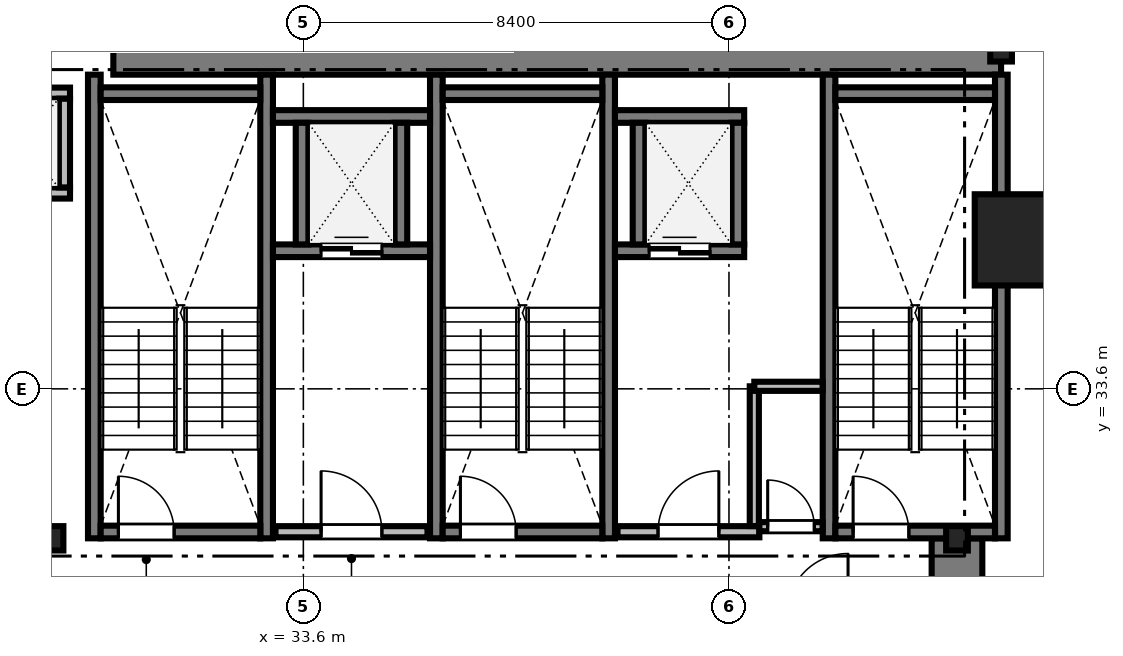
"""IFC4 building model, lengths in metres.
Left out: names, types, materials, properties, quantities, classifications, styles, units other than length and angle.
Written with IfcOpenShell. Run it as: python <this file> out.ifc"""

import sys

from ifc_helpers import new_model, si_unit, direction, frame, frame_2d, origin, origin_2d, place, context, subcontext, project, spatial, rectangle, i_section, extrude, source, transform, mapped, element, fill, save


model = new_model("IFC4")
c1 = context("Model", 3, precision=1e-05, world=origin(), true_north=direction((0.0, 1.0)))
c2 = subcontext(c1, "Body", "Model", "MODEL_VIEW")
j1 = project(units=[si_unit("LENGTHUNIT", "METRE"), si_unit("PLANEANGLEUNIT", "RADIAN")], contexts=[c1])
p1 = place(None, origin())
s1 = spatial("IfcSite", under=j1, at=p1, CompositionType="ELEMENT")
p2 = place(p1, origin())
s2 = spatial("IfcBuilding", under=s1, at=p2, CompositionType="ELEMENT")
p3 = place(p2, frame((0.0, 0.0, 27.6)))
s3 = spatial("IfcBuildingStorey", under=s2, at=p3, CompositionType="ELEMENT", Elevation=27.6)
m1 = source(origin(), c2, "Body", "SweptSolid", [
    extrude(rectangle(XDim=17.52, YDim=1.0, at=frame_2d((8.76, 0.0))), origin(), (0.0, 0.0, 1.0), 3.41),
])
p4 = place(p3, frame((29.85, 40.3, 0.0), z_axis=(0.0, 0.0, 1.0), x_axis=(1.0, 0.0, 0.0)))
e1 = element("IfcWall", 1, at=p4, inside=s3, PredefinedType="SHEAR", context=c2, shape_type="MappedRepresentation", body=[
    mapped(m1, transform((0.0, 0.0, 0.0), scale=1.0)),
])
m2 = source(origin(), c2, "Body", "SweptSolid", [
    extrude(rectangle(XDim=13.15, YDim=1.0, at=frame_2d((6.575, 0.0))), origin(), (0.0, 0.0, 1.0), 3.41),
])
p5 = place(p3, frame((46.5, 17.5, 0.0), z_axis=(0.0, 0.0, 1.0), x_axis=(0.0, 1.0, 0.0)))
e2 = element("IfcWall", 2, at=p5, inside=s3, PredefinedType="SHEAR", context=c2, shape_type="MappedRepresentation", body=[
    mapped(m2, transform((0.0, 0.0, 0.0), scale=1.0)),
])
m3 = source(origin(), c2, "Body", "SweptSolid", [
    extrude(i_section(OverallWidth=0.428, OverallDepth=0.481, WebThickness=0.04, FlangeThickness=0.063, FilletRadius=0.015, at=origin_2d()), origin(), (0.0, 0.0, 1.0), 3.41),
])
for number, where, z_axis, x_axis in (
    (3, (28.65, 30.65, 0.0), (0.0, 0.0, 1.0), (1.0, 0.0, 0.0)),
    (4, (46.5, 30.65, 0.0), (0.0, 0.0, 1.0), (1.0, 0.0, 0.0)),
    (5, (47.37, 40.3, 0.0), (0.0, 0.0, 1.0), (1.0, 0.0, 0.0)),
):
    element("IfcColumn", number, at=place(p3, frame(where, z_axis=z_axis, x_axis=x_axis)), inside=s3, PredefinedType="COLUMN", context=c2, shape_type="MappedRepresentation", body=[
        mapped(m3, transform((0.0, 0.0, 0.0), scale=1.0)),
    ])
m4 = source(origin(), c2, "Body", "SweptSolid", [
    extrude(rectangle(XDim=1.8, YDim=1.8, at=origin_2d()), origin(), (0.0, 0.0, 1.0), 3.41),
])
p6 = place(p3, frame((47.75, 36.54, 0.0), z_axis=(0.0, 0.0, 1.0), x_axis=(1.0, 0.0, 0.0)))
e6 = element("IfcColumn", 6, at=p6, inside=s3, PredefinedType="COLUMN", context=c2, shape_type="MappedRepresentation", body=[
    mapped(m4, transform((0.0, 0.0, 0.0), scale=1.0)),
])
m5 = source(origin(), c2, "Body", "SweptSolid", [
    extrude(rectangle(XDim=9.15, YDim=0.25, at=frame_2d((4.575, 0.0))), origin(), (0.0, 0.0, 1.0), 3.45),
])
for number, where, z_axis, x_axis in (
    (7, (29.475, 30.65, 0.0), (0.0, 0.0, 1.0), (0.0, 1.0, 0.0)),
    (8, (32.875, 30.65, 0.0), (0.0, 0.0, 1.0), (0.0, 1.0, 0.0)),
):
    element("IfcWall", number, at=place(p3, frame(where, z_axis=z_axis, x_axis=x_axis)), inside=s3, PredefinedType="SOLIDWALL", context=c2, shape_type="MappedRepresentation", body=[
        mapped(m5, transform((0.0, 0.0, 0.0), scale=1.0)),
    ])
m6 = source(origin(), c2, "Body", "SweptSolid", [
    extrude(rectangle(XDim=3.15, YDim=0.25, at=frame_2d((1.575, 0.0))), origin(), (0.0, 0.0, 1.0), 3.45),
])
p7 = place(p3, frame((29.6, 39.425, 0.0), z_axis=(0.0, 0.0, 1.0), x_axis=(1.0, 0.0, 0.0)))
e9 = element("IfcWall", 9, at=p7, inside=s3, PredefinedType="SOLIDWALL", context=c2, shape_type="MappedRepresentation", body=[
    mapped(m6, transform((0.0, 0.0, 0.0), scale=1.0)),
])
p8 = place(p3, frame((29.6, 30.775, 0.0), z_axis=(0.0, 0.0, 1.0), x_axis=(1.0, 0.0, 0.0)))
e10 = element("IfcWall", 10, at=p8, inside=s3, PredefinedType="SOLIDWALL", context=c2, shape_type="MappedRepresentation", body=[
    mapped(m6, transform((0.0, 0.0, 0.0), scale=1.0)),
])
m7 = source(origin(), c2, "Body", "SweptSolid", [
    extrude(rectangle(XDim=1.1, YDim=2.2, at=frame_2d((0.55, 1.1))), frame((0.0, 0.135, 0.0), z_axis=(0.0, -1.0, 0.0), x_axis=(1.0, 0.0, 0.0)), (0.0, 0.0, 1.0), 0.27),
])
p9 = place(p8, frame((0.35, 0.0, 0.0)))
e11 = element("IfcOpeningElement", 11, at=p9, cuts=e10, PredefinedType="OPENING", context=c2, shape_type="MappedRepresentation", body=[
    mapped(m7, transform((0.0, 0.0, 0.0), scale=1.0)),
])
for number, where, z_axis, x_axis in (
    (12, (36.225, 30.65, 0.0), (0.0, 0.0, 1.0), (0.0, 1.0, 0.0)),
    (13, (39.625, 30.65, 0.0), (0.0, 0.0, 1.0), (0.0, 1.0, 0.0)),
):
    element("IfcWall", number, at=place(p3, frame(where, z_axis=z_axis, x_axis=x_axis)), inside=s3, PredefinedType="SOLIDWALL", context=c2, shape_type="MappedRepresentation", body=[
        mapped(m5, transform((0.0, 0.0, 0.0), scale=1.0)),
    ])
p10 = place(p3, frame((36.35, 39.425, 0.0), z_axis=(0.0, 0.0, 1.0), x_axis=(1.0, 0.0, 0.0)))
e14 = element("IfcWall", 14, at=p10, inside=s3, PredefinedType="SOLIDWALL", context=c2, shape_type="MappedRepresentation", body=[
    mapped(m6, transform((0.0, 0.0, 0.0), scale=1.0)),
])
p11 = place(p3, frame((36.35, 30.775, 0.0), z_axis=(0.0, 0.0, 1.0), x_axis=(1.0, 0.0, 0.0)))
e15 = element("IfcWall", 15, at=p11, inside=s3, PredefinedType="SOLIDWALL", context=c2, shape_type="MappedRepresentation", body=[
    mapped(m6, transform((0.0, 0.0, 0.0), scale=1.0)),
])
p12 = place(p11, frame((0.35, 0.0, 0.0)))
e16 = element("IfcOpeningElement", 16, at=p12, cuts=e15, PredefinedType="OPENING", context=c2, shape_type="MappedRepresentation", body=[
    mapped(m7, transform((0.0, 0.0, 0.0), scale=1.0)),
])
for number, where, z_axis, x_axis in (
    (17, (43.975, 30.65, 0.0), (0.0, 0.0, 1.0), (0.0, 1.0, 0.0)),
    (18, (47.375, 30.65, 0.0), (0.0, 0.0, 1.0), (0.0, 1.0, 0.0)),
):
    element("IfcWall", number, at=place(p3, frame(where, z_axis=z_axis, x_axis=x_axis)), inside=s3, PredefinedType="SOLIDWALL", context=c2, shape_type="MappedRepresentation", body=[
        mapped(m5, transform((0.0, 0.0, 0.0), scale=1.0)),
    ])
p13 = place(p3, frame((44.1, 39.425, 0.0), z_axis=(0.0, 0.0, 1.0), x_axis=(1.0, 0.0, 0.0)))
e19 = element("IfcWall", 19, at=p13, inside=s3, PredefinedType="SOLIDWALL", context=c2, shape_type="MappedRepresentation", body=[
    mapped(m6, transform((0.0, 0.0, 0.0), scale=1.0)),
])
p14 = place(p3, frame((44.1, 30.775, 0.0), z_axis=(0.0, 0.0, 1.0), x_axis=(1.0, 0.0, 0.0)))
e20 = element("IfcWall", 20, at=p14, inside=s3, PredefinedType="SOLIDWALL", context=c2, shape_type="MappedRepresentation", body=[
    mapped(m6, transform((0.0, 0.0, 0.0), scale=1.0)),
])
p15 = place(p14, frame((0.35, 0.0, 0.0)))
e21 = element("IfcOpeningElement", 21, at=p15, cuts=e20, PredefinedType="OPENING", context=c2, shape_type="MappedRepresentation", body=[
    mapped(m7, transform((0.0, 0.0, 0.0), scale=1.0)),
])
m8 = source(origin(), c2, "Body", "SweptSolid", [
    extrude(rectangle(XDim=3.0, YDim=0.22, at=frame_2d((1.5, 0.0))), origin(), (0.0, 0.0, 1.0), 3.41),
])
p16 = place(p3, frame((33.05, 30.78, 0.0), z_axis=(0.0, 0.0, 1.0), x_axis=(1.0, 0.0, 0.0)))
e22 = element("IfcWall", 22, at=p16, inside=s3, PredefinedType="SOLIDWALL", context=c2, shape_type="MappedRepresentation", body=[
    mapped(m8, transform((0.0, 0.0, 0.0), scale=1.0)),
])
m9 = source(origin(), c2, "Body", "SweptSolid", [
    extrude(rectangle(XDim=1.2, YDim=2.2, at=frame_2d((0.6, 1.1))), frame((0.0, 0.12, 0.0), z_axis=(0.0, -1.0, 0.0), x_axis=(1.0, 0.0, 0.0)), (0.0, 0.0, 1.0), 0.24),
])
p17 = place(p16, frame((0.9, 0.0, 0.0)))
e23 = element("IfcOpeningElement", 23, at=p17, cuts=e22, PredefinedType="OPENING", context=c2, shape_type="MappedRepresentation", body=[
    mapped(m9, transform((0.0, 0.0, 0.0), scale=1.0)),
])
m10 = source(origin(), c2, "Body", "SweptSolid", [
    extrude(rectangle(XDim=2.8, YDim=0.22, at=frame_2d((1.4, 0.0))), origin(), (0.0, 0.0, 1.0), 3.41),
])
p18 = place(p3, frame((39.8, 30.78, 0.0), z_axis=(0.0, 0.0, 1.0), x_axis=(1.0, 0.0, 0.0)))
e24 = element("IfcWall", 24, at=p18, inside=s3, PredefinedType="SOLIDWALL", context=c2, shape_type="MappedRepresentation", body=[
    mapped(m10, transform((0.0, 0.0, 0.0), scale=1.0)),
])
p19 = place(p18, frame((0.8, 0.0, 0.0)))
e25 = element("IfcOpeningElement", 25, at=p19, cuts=e24, PredefinedType="OPENING", context=c2, shape_type="MappedRepresentation", body=[
    mapped(m9, transform((0.0, 0.0, 0.0), scale=1.0)),
])
m11 = source(origin(), c2, "Body", "SweptSolid", [
    extrude(rectangle(XDim=1.99, YDim=0.22, at=frame_2d((0.995, 0.0))), origin(), (0.0, 0.0, 1.0), 3.41),
])
p20 = place(p3, frame((27.005, 37.465, 0.0), z_axis=(0.0, 0.0, 1.0), x_axis=(1.0, 0.0, 0.0)))
e26 = element("IfcWall", 26, at=p20, inside=s3, PredefinedType="SOLIDWALL", context=c2, shape_type="MappedRepresentation", body=[
    mapped(m11, transform((0.0, 0.0, 0.0), scale=1.0)),
])
m12 = source(origin(), c2, "Body", "SweptSolid", [
    extrude(rectangle(XDim=1.1, YDim=2.2, at=frame_2d((0.55, 1.1))), frame((0.0, 0.12, 0.0), z_axis=(0.0, -1.0, 0.0), x_axis=(1.0, 0.0, 0.0)), (0.0, 0.0, 1.0), 0.24),
])
p21 = place(p20, frame((0.445, 0.0, 0.0)))
e27 = element("IfcOpeningElement", 27, at=p21, cuts=e26, PredefinedType="OPENING", context=c2, shape_type="MappedRepresentation", body=[
    mapped(m12, transform((0.0, 0.0, 0.0), scale=1.0)),
])
p22 = place(p3, frame((27.005, 39.435, 0.0), z_axis=(0.0, 0.0, 1.0), x_axis=(1.0, 0.0, 0.0)))
e28 = element("IfcWall", 28, at=p22, inside=s3, PredefinedType="SOLIDWALL", context=c2, shape_type="MappedRepresentation", body=[
    mapped(m11, transform((0.0, 0.0, 0.0), scale=1.0)),
])
m13 = source(origin(), c2, "Body", "SweptSolid", [
    extrude(rectangle(XDim=1.75, YDim=0.22, at=frame_2d((0.875, 0.0))), origin(), (0.0, 0.0, 1.0), 3.41),
])
p23 = place(p3, frame((28.885, 37.575, 0.0), z_axis=(0.0, 0.0, 1.0), x_axis=(0.0, 1.0, 0.0)))
e29 = element("IfcWall", 29, at=p23, inside=s3, PredefinedType="SOLIDWALL", context=c2, shape_type="MappedRepresentation", body=[
    mapped(m13, transform((0.0, 0.0, 0.0), scale=1.0)),
])
m14 = source(origin(), c2, "Body", "SweptSolid", [
    extrude(rectangle(XDim=3.1, YDim=0.25, at=frame_2d((1.55, 0.0))), origin(), (0.0, 0.0, 1.0), 3.41),
])
p24 = place(p3, frame((33.0, 36.325, 0.0), z_axis=(0.0, 0.0, 1.0), x_axis=(1.0, 0.0, 0.0)))
e30 = element("IfcWall", 30, at=p24, inside=s3, PredefinedType="SOLIDWALL", context=c2, shape_type="MappedRepresentation", body=[
    mapped(m14, transform((0.0, 0.0, 0.0), scale=1.0)),
])
m15 = source(origin(), c2, "Body", "SweptSolid", [
    extrude(rectangle(XDim=1.2, YDim=2.25, at=frame_2d((0.6, 1.125))), frame((0.0, 0.135, 0.0), z_axis=(0.0, -1.0, 0.0), x_axis=(1.0, 0.0, 0.0)), (0.0, 0.0, 1.0), 0.27),
])
p25 = place(p24, frame((0.95, 0.0, 0.0)))
e31 = element("IfcOpeningElement", 31, at=p25, cuts=e30, PredefinedType="OPENING", context=c2, shape_type="MappedRepresentation", body=[
    mapped(m15, transform((0.0, 0.0, 0.0), scale=1.0)),
])
p26 = place(p3, frame((33.0, 38.975, 0.0), z_axis=(0.0, 0.0, 1.0), x_axis=(1.0, 0.0, 0.0)))
e32 = element("IfcWall", 32, at=p26, inside=s3, PredefinedType="SOLIDWALL", context=c2, shape_type="MappedRepresentation", body=[
    mapped(m14, transform((0.0, 0.0, 0.0), scale=1.0)),
])
m16 = source(origin(), c2, "Body", "SweptSolid", [
    extrude(rectangle(XDim=2.4, YDim=0.25, at=frame_2d((1.2, 0.0))), origin(), (0.0, 0.0, 1.0), 3.41),
])
for number, where, z_axis, x_axis in (
    (33, (33.575, 36.45, 0.0), (0.0, 0.0, 1.0), (0.0, 1.0, 0.0)),
    (34, (35.525, 36.45, 0.0), (0.0, 0.0, 1.0), (0.0, 1.0, 0.0)),
):
    element("IfcWall", number, at=place(p3, frame(where, z_axis=z_axis, x_axis=x_axis)), inside=s3, PredefinedType="SOLIDWALL", context=c2, shape_type="MappedRepresentation", body=[
        mapped(m16, transform((0.0, 0.0, 0.0), scale=1.0)),
    ])
m17 = source(origin(), c2, "Body", "SweptSolid", [
    extrude(rectangle(XDim=2.55, YDim=0.25, at=frame_2d((1.275, 0.0))), origin(), (0.0, 0.0, 1.0), 3.41),
])
p27 = place(p3, frame((39.75, 36.325, 0.0), z_axis=(0.0, 0.0, 1.0), x_axis=(1.0, 0.0, 0.0)))
e35 = element("IfcWall", 35, at=p27, inside=s3, PredefinedType="SOLIDWALL", context=c2, shape_type="MappedRepresentation", body=[
    mapped(m17, transform((0.0, 0.0, 0.0), scale=1.0)),
])
p28 = place(p27, frame((0.675, 0.0, 0.0)))
e36 = element("IfcOpeningElement", 36, at=p28, cuts=e35, PredefinedType="OPENING", context=c2, shape_type="MappedRepresentation", body=[
    mapped(m15, transform((0.0, 0.0, 0.0), scale=1.0)),
])
p29 = place(p3, frame((39.75, 38.975, 0.0), z_axis=(0.0, 0.0, 1.0), x_axis=(1.0, 0.0, 0.0)))
e37 = element("IfcWall", 37, at=p29, inside=s3, PredefinedType="SOLIDWALL", context=c2, shape_type="MappedRepresentation", body=[
    mapped(m17, transform((0.0, 0.0, 0.0), scale=1.0)),
])
for number, where, z_axis, x_axis in (
    (38, (40.225, 36.45, 0.0), (0.0, 0.0, 1.0), (0.0, 1.0, 0.0)),
    (39, (42.175, 36.45, 0.0), (0.0, 0.0, 1.0), (0.0, 1.0, 0.0)),
):
    element("IfcWall", number, at=place(p3, frame(where, z_axis=z_axis, x_axis=x_axis)), inside=s3, PredefinedType="SOLIDWALL", context=c2, shape_type="MappedRepresentation", body=[
        mapped(m16, transform((0.0, 0.0, 0.0), scale=1.0)),
    ])
m18 = source(origin(), c2, "Body", "SweptSolid", [
    extrude(rectangle(XDim=1.248, YDim=0.18, at=frame_2d((0.624, 0.0))), origin(), (0.0, 0.0, 1.0), 3.41),
])
p30 = place(p3, frame((42.6, 30.88, 0.0), z_axis=(0.0, 0.0, 1.0), x_axis=(1.0, 0.0, 0.0)))
e40 = element("IfcWall", 40, at=p30, inside=s3, PredefinedType="PARTITIONING", context=c2, shape_type="MappedRepresentation", body=[
    mapped(m18, transform((0.0, 0.0, 0.0), scale=1.0)),
])
m19 = source(origin(), c2, "Body", "SweptSolid", [
    extrude(rectangle(XDim=0.92, YDim=2.1, at=frame_2d((0.46, 1.05))), frame((0.0, 0.1, 0.0), z_axis=(0.0, -1.0, 0.0), x_axis=(1.0, 0.0, 0.0)), (0.0, 0.0, 1.0), 0.2),
])
p31 = place(p30, frame((0.164, 0.0, 0.0)))
e41 = element("IfcOpeningElement", 41, at=p31, cuts=e40, PredefinedType="OPENING", context=c2, shape_type="MappedRepresentation", body=[
    mapped(m19, transform((0.0, 0.0, 0.0), scale=1.0)),
])
m20 = source(origin(), c2, "Body", "SweptSolid", [
    extrude(rectangle(XDim=2.758, YDim=0.18, at=frame_2d((1.379, 0.0))), origin(), (0.0, 0.0, 1.0), 3.41),
])
p32 = place(p3, frame((42.5, 30.892, 0.0), z_axis=(0.0, 0.0, 1.0), x_axis=(0.0, 1.0, 0.0)))
e42 = element("IfcWall", 42, at=p32, inside=s3, PredefinedType="PARTITIONING", context=c2, shape_type="MappedRepresentation", body=[
    mapped(m20, transform((0.0, 0.0, 0.0), scale=1.0)),
])
m21 = source(origin(), c2, "Body", "SweptSolid", [
    extrude(rectangle(XDim=1.348, YDim=0.18, at=frame_2d((0.674, 0.0))), origin(), (0.0, 0.0, 1.0), 3.41),
])
p33 = place(p3, frame((42.5, 33.65, 0.0), z_axis=(0.0, 0.0, 1.0), x_axis=(1.0, 0.0, 0.0)))
e43 = element("IfcWall", 43, at=p33, inside=s3, PredefinedType="PARTITIONING", context=c2, shape_type="MappedRepresentation", body=[
    mapped(m21, transform((0.0, 0.0, 0.0), scale=1.0)),
])
m22 = source(origin(), c2, "Body", "SweptSolid", [
    extrude(rectangle(XDim=1.1, YDim=2.2, at=frame_2d((0.55, 1.1))), frame((0.0, 0.025, 0.0), z_axis=(0.0, -1.0, 0.0), x_axis=(1.0, 0.0, 0.0)), (0.0, 0.0, 1.0), 0.05),
])
p34 = place(p9, origin())
e44 = element("IfcDoor", 44, at=p34, inside=s3, OperationType="SINGLE_SWING_LEFT", PredefinedType="DOOR", context=c2, shape_type="MappedRepresentation", body=[
    mapped(m22, transform((0.0, 0.0, 0.0), scale=1.0)),
])
fill(e11, e44)
p35 = place(p12, origin())
e45 = element("IfcDoor", 45, at=p35, inside=s3, OperationType="SINGLE_SWING_LEFT", PredefinedType="DOOR", context=c2, shape_type="MappedRepresentation", body=[
    mapped(m22, transform((0.0, 0.0, 0.0), scale=1.0)),
])
fill(e16, e45)
p36 = place(p15, origin())
e46 = element("IfcDoor", 46, at=p36, inside=s3, OperationType="SINGLE_SWING_LEFT", PredefinedType="DOOR", context=c2, shape_type="MappedRepresentation", body=[
    mapped(m22, transform((0.0, 0.0, 0.0), scale=1.0)),
])
fill(e21, e46)
m23 = source(origin(), c2, "Body", "SweptSolid", [
    extrude(rectangle(XDim=1.2, YDim=2.2, at=frame_2d((0.6, 1.1))), frame((0.0, 0.025, 0.0), z_axis=(0.0, -1.0, 0.0), x_axis=(1.0, 0.0, 0.0)), (0.0, 0.0, 1.0), 0.05),
])
p37 = place(p17, origin())
e47 = element("IfcDoor", 47, at=p37, inside=s3, OperationType="SINGLE_SWING_LEFT", PredefinedType="DOOR", context=c2, shape_type="MappedRepresentation", body=[
    mapped(m23, transform((0.0, 0.0, 0.0), scale=1.0)),
])
fill(e23, e47)
p38 = place(p19, origin())
e48 = element("IfcDoor", 48, at=p38, inside=s3, OperationType="SINGLE_SWING_RIGHT", PredefinedType="DOOR", context=c2, shape_type="MappedRepresentation", body=[
    mapped(m23, transform((0.0, 0.0, 0.0), scale=1.0)),
])
fill(e25, e48)
m24 = source(origin(), c2, "Body", "SweptSolid", [
    extrude(rectangle(XDim=1.2, YDim=2.25, at=frame_2d((0.6, 1.125))), frame((0.0, 0.025, 0.0), z_axis=(0.0, -1.0, 0.0), x_axis=(1.0, 0.0, 0.0)), (0.0, 0.0, 1.0), 0.05),
])
p39 = place(p25, origin())
e49 = element("IfcDoor", 49, at=p39, inside=s3, OperationType="DOUBLE_DOOR_SLIDING", PredefinedType="DOOR", context=c2, shape_type="MappedRepresentation", body=[
    mapped(m24, transform((0.0, 0.0, 0.0), scale=1.0)),
])
fill(e31, e49)
p40 = place(p28, origin())
e50 = element("IfcDoor", 50, at=p40, inside=s3, OperationType="DOUBLE_DOOR_SLIDING", PredefinedType="DOOR", context=c2, shape_type="MappedRepresentation", body=[
    mapped(m24, transform((0.0, 0.0, 0.0), scale=1.0)),
])
fill(e36, e50)
m25 = source(origin(), c2, "Body", "SweptSolid", [
    extrude(rectangle(XDim=0.92, YDim=2.1, at=frame_2d((0.46, 1.05))), frame((0.0, 0.025, 0.0), z_axis=(0.0, -1.0, 0.0), x_axis=(1.0, 0.0, 0.0)), (0.0, 0.0, 1.0), 0.05),
])
p41 = place(p31, origin())
e51 = element("IfcDoor", 51, at=p41, inside=s3, OperationType="SINGLE_SWING_LEFT", PredefinedType="DOOR", context=c2, shape_type="MappedRepresentation", body=[
    mapped(m25, transform((0.0, 0.0, 0.0), scale=1.0)),
])
fill(e41, e51)
save(model, sys.argv[1])
